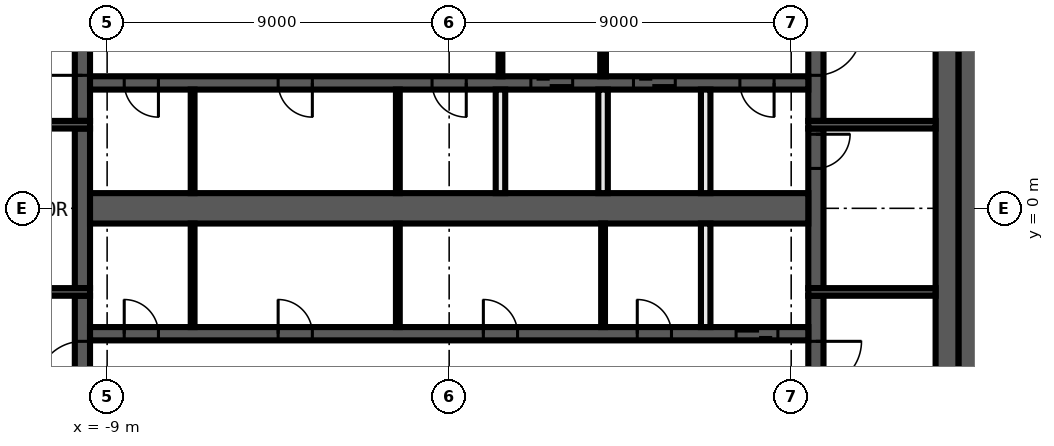
"""IFC4 building model, lengths in metres.
Left out: names, types, materials, properties, quantities, classifications, styles, units other than length and angle.
Written with IfcOpenShell. Run it as: python <this file> out.ifc"""

import sys

from ifc_helpers import new_model, si_unit, direction, frame, frame_2d, origin, place, context, subcontext, project, spatial, rectangle, extrude, element, fill, save


model = new_model("IFC4")
c1 = context("Model", 3, precision=1e-05, world=origin(), true_north=direction((0.0, 1.0)))
c2 = subcontext(c1, "Body", "Model", "MODEL_VIEW")
j1 = project(units=[si_unit("LENGTHUNIT", "METRE"), si_unit("PLANEANGLEUNIT", "RADIAN")], contexts=[c1])
p1 = place(None, origin())
s1 = spatial("IfcSite", under=j1, at=p1, CompositionType="ELEMENT")
p2 = place(p1, origin())
s2 = spatial("IfcBuilding", under=s1, at=p2, CompositionType="ELEMENT")
p3 = place(p2, frame((0.0, 0.0, 367.4)))
s3 = spatial("IfcBuildingStorey", under=s2, at=p3, CompositionType="ELEMENT", Elevation=367.4)
p4 = place(p3, frame((11.367, -20.469, 0.0), z_axis=(0.0, 0.0, 1.0), x_axis=(0.424125024155, 0.905603646131, 0.0)))
e1 = element("IfcWall", 1, at=p4, inside=s3, PredefinedType="SOLIDWALL", context=c2, shape_type="SweptSolid", body=[
    extrude(rectangle(XDim=28.801, YDim=0.25, at=frame_2d((14.401, 0.0))), origin(), (0.0, 0.0, 1.0), 3.8),
])
p5 = place(p3, frame((13.7, 10.4, 0.0), z_axis=(0.0, 0.0, 1.0), x_axis=(0.0, -1.0, 0.0)))
e2 = element("IfcWall", 2, at=p5, inside=s3, PredefinedType="SHEAR", context=c2, shape_type="SweptSolid", body=[
    extrude(rectangle(XDim=20.8, YDim=0.6, at=frame_2d((10.4, 0.0))), origin(), (0.0, 0.0, 1.0), 3.8),
])
p6 = place(p3, frame((13.1, 9.8, 0.0), z_axis=(0.0, 0.0, 1.0), x_axis=(0.0, -1.0, 0.0)))
e3 = element("IfcWall", 3, at=p6, inside=s3, PredefinedType="SHEAR", context=c2, shape_type="SweptSolid", body=[
    extrude(rectangle(XDim=19.6, YDim=0.6, at=frame_2d((9.8, 0.0))), origin(), (0.0, 0.0, 1.0), 3.8),
])
p7 = place(p3, frame((9.65, -2.3, 0.0), z_axis=(0.0, 0.0, 1.0), x_axis=(0.0, -1.0, 0.0)))
e4 = element("IfcWall", 4, at=p7, inside=s3, PredefinedType="SHEAR", context=c2, shape_type="SweptSolid", body=[
    extrude(rectangle(XDim=7.5, YDim=0.4, at=frame_2d((3.75, 0.0))), origin(), (0.0, 0.0, 1.0), 3.8),
])
p8 = place(p7, frame((1.2, 0.0, 0.0)))
e5 = element("IfcOpeningElement", 5, at=p8, cuts=e4, PredefinedType="OPENING", context=c2, shape_type="SweptSolid", body=[
    extrude(rectangle(XDim=1.2, YDim=2.1, at=frame_2d((0.6, 1.05))), frame((0.0, 0.21, 0.0), z_axis=(0.0, -1.0, 0.0), x_axis=(1.0, 0.0, 0.0)), (0.0, 0.0, 1.0), 0.42),
])
p9 = place(p3, frame((9.65, 2.1, 0.0), z_axis=(0.0, 0.0, 1.0), x_axis=(0.0, -1.0, 0.0)))
e6 = element("IfcWall", 6, at=p9, inside=s3, PredefinedType="SHEAR", context=c2, shape_type="SweptSolid", body=[
    extrude(rectangle(XDim=4.2, YDim=0.4, at=frame_2d((2.1, 0.0))), origin(), (0.0, 0.0, 1.0), 3.8),
])
p10 = place(p9, frame((0.15, 0.0, 0.0)))
e7 = element("IfcOpeningElement", 7, at=p10, cuts=e6, PredefinedType="OPENING", context=c2, shape_type="SweptSolid", body=[
    extrude(rectangle(XDim=0.9, YDim=2.1, at=frame_2d((0.45, 1.05))), frame((0.0, 0.21, 0.0), z_axis=(0.0, -1.0, 0.0), x_axis=(1.0, 0.0, 0.0)), (0.0, 0.0, 1.0), 0.42),
])
p11 = place(p3, frame((9.65, 9.8, 0.0), z_axis=(0.0, 0.0, 1.0), x_axis=(0.0, -1.0, 0.0)))
e8 = element("IfcWall", 8, at=p11, inside=s3, PredefinedType="SHEAR", context=c2, shape_type="SweptSolid", body=[
    extrude(rectangle(XDim=7.5, YDim=0.4, at=frame_2d((3.75, 0.0))), origin(), (0.0, 0.0, 1.0), 3.8),
])
p12 = place(p11, frame((5.1, 0.0, 0.0)))
e9 = element("IfcOpeningElement", 9, at=p12, cuts=e8, PredefinedType="OPENING", context=c2, shape_type="SweptSolid", body=[
    extrude(rectangle(XDim=1.2, YDim=2.1, at=frame_2d((0.6, 1.05))), frame((0.0, 0.21, 0.0), z_axis=(0.0, -1.0, 0.0), x_axis=(1.0, 0.0, 0.0)), (0.0, 0.0, 1.0), 0.42),
])
p13 = place(p3, frame((-9.65, -9.8, 0.0), z_axis=(0.0, 0.0, 1.0), x_axis=(0.0, 1.0, 0.0)))
e10 = element("IfcWall", 10, at=p13, inside=s3, PredefinedType="SHEAR", context=c2, shape_type="SweptSolid", body=[
    extrude(rectangle(XDim=7.5, YDim=0.4, at=frame_2d((3.75, 0.0))), origin(), (0.0, 0.0, 1.0), 3.8),
])
p14 = place(p13, frame((5.1, 0.0, 0.0)))
e11 = element("IfcOpeningElement", 11, at=p14, cuts=e10, PredefinedType="OPENING", context=c2, shape_type="SweptSolid", body=[
    extrude(rectangle(XDim=1.2, YDim=2.1, at=frame_2d((0.6, 1.05))), frame((0.0, 0.21, 0.0), z_axis=(0.0, -1.0, 0.0), x_axis=(1.0, 0.0, 0.0)), (0.0, 0.0, 1.0), 0.42),
])
p15 = place(p3, frame((-9.65, -2.1, 0.0), z_axis=(0.0, 0.0, 1.0), x_axis=(0.0, 1.0, 0.0)))
e12 = element("IfcWall", 12, at=p15, inside=s3, PredefinedType="SHEAR", context=c2, shape_type="SweptSolid", body=[
    extrude(rectangle(XDim=4.2, YDim=0.4, at=frame_2d((2.1, 0.0))), origin(), (0.0, 0.0, 1.0), 3.8),
])
p16 = place(p3, frame((-9.65, 2.3, 0.0), z_axis=(0.0, 0.0, 1.0), x_axis=(0.0, 1.0, 0.0)))
e13 = element("IfcWall", 13, at=p16, inside=s3, PredefinedType="SHEAR", context=c2, shape_type="SweptSolid", body=[
    extrude(rectangle(XDim=7.5, YDim=0.4, at=frame_2d((3.75, 0.0))), origin(), (0.0, 0.0, 1.0), 3.8),
])
p17 = place(p16, frame((1.2, 0.0, 0.0)))
e14 = element("IfcOpeningElement", 14, at=p17, cuts=e13, PredefinedType="OPENING", context=c2, shape_type="SweptSolid", body=[
    extrude(rectangle(XDim=1.2, YDim=2.1, at=frame_2d((0.6, 1.05))), frame((0.0, 0.21, 0.0), z_axis=(0.0, -1.0, 0.0), x_axis=(1.0, 0.0, 0.0)), (0.0, 0.0, 1.0), 0.42),
])
for number, where, z_axis, x_axis in (
    (15, (9.45, 2.2, 0.0), (0.0, 0.0, 1.0), (1.0, 0.0, 0.0)),
    (16, (-9.45, 2.2, 0.0), (0.0, 0.0, 1.0), (-1.0, 0.0, 0.0)),
    (17, (9.45, -2.2, 0.0), (0.0, 0.0, 1.0), (1.0, 0.0, 0.0)),
    (18, (-9.45, -2.2, 0.0), (0.0, 0.0, 1.0), (-1.0, 0.0, 0.0)),
):
    element("IfcWall", number, at=place(p3, frame(where, z_axis=z_axis, x_axis=x_axis)), inside=s3, PredefinedType="SHEAR", context=c2, shape_type="SweptSolid", body=[
        extrude(rectangle(XDim=3.35, YDim=0.2, at=frame_2d((1.675, 0.0))), origin(), (0.0, 0.0, 1.0), 3.8),
    ])
p18 = place(p3, frame((9.45, 3.3, 0.0), z_axis=(0.0, 0.0, 1.0), x_axis=(-1.0, 0.0, 0.0)))
e19 = element("IfcWall", 19, at=p18, inside=s3, PredefinedType="SHEAR", context=c2, shape_type="SweptSolid", body=[
    extrude(rectangle(XDim=18.9, YDim=0.35, at=frame_2d((9.45, 0.0))), origin(), (0.0, 0.0, 1.0), 3.8),
])
p19 = place(p18, frame((6.2, 0.0, 0.0)))
e20 = element("IfcOpeningElement", 20, at=p19, cuts=e19, PredefinedType="OPENING", context=c2, shape_type="SweptSolid", body=[
    extrude(rectangle(XDim=1.1, YDim=2.1, at=frame_2d((0.55, 1.05))), frame((0.0, 0.185, 0.0), z_axis=(0.0, -1.0, 0.0), x_axis=(1.0, 0.0, 0.0)), (0.0, 0.0, 1.0), 0.37),
])
p20 = place(p18, frame((3.5, 0.0, 0.0)))
e21 = element("IfcOpeningElement", 21, at=p20, cuts=e19, PredefinedType="OPENING", context=c2, shape_type="SweptSolid", body=[
    extrude(rectangle(XDim=1.1, YDim=2.1, at=frame_2d((0.55, 1.05))), frame((0.0, 0.185, 0.0), z_axis=(0.0, -1.0, 0.0), x_axis=(1.0, 0.0, 0.0)), (0.0, 0.0, 1.0), 0.37),
])
p21 = place(p18, frame((0.9, 0.0, 0.0)))
e22 = element("IfcOpeningElement", 22, at=p21, cuts=e19, PredefinedType="OPENING", context=c2, shape_type="SweptSolid", body=[
    extrude(rectangle(XDim=0.9, YDim=2.1, at=frame_2d((0.45, 1.05))), frame((0.0, 0.185, 0.0), z_axis=(0.0, -1.0, 0.0), x_axis=(1.0, 0.0, 0.0)), (0.0, 0.0, 1.0), 0.37),
])
p22 = place(p18, frame((17.1, 0.0, 0.0)))
e23 = element("IfcOpeningElement", 23, at=p22, cuts=e19, PredefinedType="OPENING", context=c2, shape_type="SweptSolid", body=[
    extrude(rectangle(XDim=0.9, YDim=2.1, at=frame_2d((0.45, 1.05))), frame((0.0, 0.185, 0.0), z_axis=(0.0, -1.0, 0.0), x_axis=(1.0, 0.0, 0.0)), (0.0, 0.0, 1.0), 0.37),
])
p23 = place(p18, frame((13.05, 0.0, 0.0)))
e24 = element("IfcOpeningElement", 24, at=p23, cuts=e19, PredefinedType="OPENING", context=c2, shape_type="SweptSolid", body=[
    extrude(rectangle(XDim=0.9, YDim=2.1, at=frame_2d((0.45, 1.05))), frame((0.0, 0.185, 0.0), z_axis=(0.0, -1.0, 0.0), x_axis=(1.0, 0.0, 0.0)), (0.0, 0.0, 1.0), 0.37),
])
p24 = place(p18, frame((9.0, 0.0, 0.0)))
e25 = element("IfcOpeningElement", 25, at=p24, cuts=e19, PredefinedType="OPENING", context=c2, shape_type="SweptSolid", body=[
    extrude(rectangle(XDim=0.9, YDim=2.1, at=frame_2d((0.45, 1.05))), frame((0.0, 0.185, 0.0), z_axis=(0.0, -1.0, 0.0), x_axis=(1.0, 0.0, 0.0)), (0.0, 0.0, 1.0), 0.37),
])
p25 = place(p3, frame((-9.45, -3.3, 0.0), z_axis=(0.0, 0.0, 1.0), x_axis=(1.0, 0.0, 0.0)))
e26 = element("IfcWall", 26, at=p25, inside=s3, PredefinedType="SHEAR", context=c2, shape_type="SweptSolid", body=[
    extrude(rectangle(XDim=18.9, YDim=0.35, at=frame_2d((9.45, 0.0))), origin(), (0.0, 0.0, 1.0), 3.8),
])
p26 = place(p25, frame((17.0, 0.0, 0.0)))
e27 = element("IfcOpeningElement", 27, at=p26, cuts=e26, PredefinedType="OPENING", context=c2, shape_type="SweptSolid", body=[
    extrude(rectangle(XDim=1.1, YDim=2.1, at=frame_2d((0.55, 1.05))), frame((0.0, 0.185, 0.0), z_axis=(0.0, -1.0, 0.0), x_axis=(1.0, 0.0, 0.0)), (0.0, 0.0, 1.0), 0.37),
])
p27 = place(p25, frame((0.9, 0.0, 0.0)))
e28 = element("IfcOpeningElement", 28, at=p27, cuts=e26, PredefinedType="OPENING", context=c2, shape_type="SweptSolid", body=[
    extrude(rectangle(XDim=0.9, YDim=2.1, at=frame_2d((0.45, 1.05))), frame((0.0, 0.185, 0.0), z_axis=(0.0, -1.0, 0.0), x_axis=(1.0, 0.0, 0.0)), (0.0, 0.0, 1.0), 0.37),
])
p28 = place(p25, frame((4.95, 0.0, 0.0)))
e29 = element("IfcOpeningElement", 29, at=p28, cuts=e26, PredefinedType="OPENING", context=c2, shape_type="SweptSolid", body=[
    extrude(rectangle(XDim=0.9, YDim=2.1, at=frame_2d((0.45, 1.05))), frame((0.0, 0.185, 0.0), z_axis=(0.0, -1.0, 0.0), x_axis=(1.0, 0.0, 0.0)), (0.0, 0.0, 1.0), 0.37),
])
p29 = place(p25, frame((10.35, 0.0, 0.0)))
e30 = element("IfcOpeningElement", 30, at=p29, cuts=e26, PredefinedType="OPENING", context=c2, shape_type="SweptSolid", body=[
    extrude(rectangle(XDim=0.9, YDim=2.1, at=frame_2d((0.45, 1.05))), frame((0.0, 0.185, 0.0), z_axis=(0.0, -1.0, 0.0), x_axis=(1.0, 0.0, 0.0)), (0.0, 0.0, 1.0), 0.37),
])
p30 = place(p25, frame((14.4, 0.0, 0.0)))
e31 = element("IfcOpeningElement", 31, at=p30, cuts=e26, PredefinedType="OPENING", context=c2, shape_type="SweptSolid", body=[
    extrude(rectangle(XDim=0.9, YDim=2.1, at=frame_2d((0.45, 1.05))), frame((0.0, 0.185, 0.0), z_axis=(0.0, -1.0, 0.0), x_axis=(1.0, 0.0, 0.0)), (0.0, 0.0, 1.0), 0.37),
])
p31 = place(p3, frame((-9.45, 0.0, 0.0), z_axis=(0.0, 0.0, 1.0), x_axis=(1.0, 0.0, 0.0)))
e32 = element("IfcWall", 32, at=p31, inside=s3, PredefinedType="SHEAR", context=c2, shape_type="SweptSolid", body=[
    extrude(rectangle(XDim=18.9, YDim=0.8, at=frame_2d((9.45, 0.0))), origin(), (0.0, 0.0, 1.0), 3.8),
])
for number, where, z_axis, x_axis in (
    (33, (6.75, -3.125, 0.0), (0.0, 0.0, 1.0), (0.0, 1.0, 0.0)),
    (34, (6.75, 0.4, 0.0), (0.0, 0.0, 1.0), (0.0, 1.0, 0.0)),
):
    element("IfcWall", number, at=place(p3, frame(where, z_axis=z_axis, x_axis=x_axis)), inside=s3, PredefinedType="SOLIDWALL", context=c2, shape_type="SweptSolid", body=[
        extrude(rectangle(XDim=2.725, YDim=0.25, at=frame_2d((1.363, 0.0))), origin(), (0.0, 0.0, 1.0), 3.8),
    ])
p32 = place(p3, frame((4.05, 6.725, 0.0), z_axis=(0.0, 0.0, 1.0), x_axis=(0.0, -1.0, 0.0)))
e35 = element("IfcWall", 35, at=p32, inside=s3, PredefinedType="PARTITIONING", context=c2, shape_type="SweptSolid", body=[
    extrude(rectangle(XDim=3.25, YDim=0.15, at=frame_2d((1.625, 0.0))), origin(), (0.0, 0.0, 1.0), 3.8),
])
p33 = place(p32, frame((1.025, 0.0, 0.0)))
e36 = element("IfcOpeningElement", 36, at=p33, cuts=e35, PredefinedType="OPENING", context=c2, shape_type="SweptSolid", body=[
    extrude(rectangle(XDim=1.2, YDim=2.1, at=frame_2d((0.6, 1.05))), frame((0.0, 0.085, 0.0), z_axis=(0.0, -1.0, 0.0), x_axis=(1.0, 0.0, 0.0)), (0.0, 0.0, 1.0), 0.17),
])
p34 = place(p3, frame((4.05, -3.125, 0.0), z_axis=(0.0, 0.0, 1.0), x_axis=(0.0, 1.0, 0.0)))
e37 = element("IfcWall", 37, at=p34, inside=s3, PredefinedType="PARTITIONING", context=c2, shape_type="SweptSolid", body=[
    extrude(rectangle(XDim=2.725, YDim=0.1, at=frame_2d((1.363, 0.0))), origin(), (0.0, 0.0, 1.0), 3.8),
])
p35 = place(p3, frame((4.05, 0.4, 0.0), z_axis=(0.0, 0.0, 1.0), x_axis=(0.0, 1.0, 0.0)))
e38 = element("IfcWall", 38, at=p35, inside=s3, PredefinedType="SOLIDWALL", context=c2, shape_type="SweptSolid", body=[
    extrude(rectangle(XDim=2.725, YDim=0.25, at=frame_2d((1.363, 0.0))), origin(), (0.0, 0.0, 1.0), 3.8),
])
p36 = place(p3, frame((1.35, 6.725, 0.0), z_axis=(0.0, 0.0, 1.0), x_axis=(0.0, -1.0, 0.0)))
e39 = element("IfcWall", 39, at=p36, inside=s3, PredefinedType="PARTITIONING", context=c2, shape_type="SweptSolid", body=[
    extrude(rectangle(XDim=3.25, YDim=0.1, at=frame_2d((1.625, 0.0))), origin(), (0.0, 0.0, 1.0), 3.8),
])
p37 = place(p36, frame((1.025, 0.0, 0.0)))
e40 = element("IfcOpeningElement", 40, at=p37, cuts=e39, PredefinedType="OPENING", context=c2, shape_type="SweptSolid", body=[
    extrude(rectangle(XDim=1.2, YDim=2.1, at=frame_2d((0.6, 1.05))), frame((0.0, 0.06, 0.0), z_axis=(0.0, -1.0, 0.0), x_axis=(1.0, 0.0, 0.0)), (0.0, 0.0, 1.0), 0.12),
])
p38 = place(p3, frame((1.35, 0.4, 0.0), z_axis=(0.0, 0.0, 1.0), x_axis=(0.0, 1.0, 0.0)))
e41 = element("IfcWall", 41, at=p38, inside=s3, PredefinedType="SOLIDWALL", context=c2, shape_type="SweptSolid", body=[
    extrude(rectangle(XDim=2.725, YDim=0.25, at=frame_2d((1.363, 0.0))), origin(), (0.0, 0.0, 1.0), 3.8),
])
for number, where, z_axis, x_axis in (
    (42, (-1.35, -3.125, 0.0), (0.0, 0.0, 1.0), (0.0, 1.0, 0.0)),
    (43, (-1.35, 0.4, 0.0), (0.0, 0.0, 1.0), (0.0, 1.0, 0.0)),
    (44, (-6.75, -3.125, 0.0), (0.0, 0.0, 1.0), (0.0, 1.0, 0.0)),
    (45, (-6.75, 0.4, 0.0), (0.0, 0.0, 1.0), (0.0, 1.0, 0.0)),
):
    element("IfcWall", number, at=place(p3, frame(where, z_axis=z_axis, x_axis=x_axis)), inside=s3, PredefinedType="PARTITIONING", context=c2, shape_type="SweptSolid", body=[
        extrude(rectangle(XDim=2.725, YDim=0.1, at=frame_2d((1.363, 0.0))), origin(), (0.0, 0.0, 1.0), 3.8),
    ])
p39 = place(p10, origin())
e46 = element("IfcDoor", 46, at=p39, inside=s3, OperationType="SINGLE_SWING_RIGHT", PredefinedType="DOOR", context=c2, shape_type="SweptSolid", body=[
    extrude(rectangle(XDim=0.9, YDim=2.1, at=frame_2d((0.45, 1.05))), frame((0.0, 0.025, 0.0), z_axis=(0.0, -1.0, 0.0), x_axis=(1.0, 0.0, 0.0)), (0.0, 0.0, 1.0), 0.05),
])
fill(e7, e46)
p40 = place(p19, origin())
e47 = element("IfcDoor", 47, at=p40, inside=s3, OperationType="DOUBLE_DOOR_SLIDING", PredefinedType="DOOR", context=c2, shape_type="SweptSolid", body=[
    extrude(rectangle(XDim=1.1, YDim=2.1, at=frame_2d((0.55, 1.05))), frame((0.0, 0.025, 0.0), z_axis=(0.0, -1.0, 0.0), x_axis=(1.0, 0.0, 0.0)), (0.0, 0.0, 1.0), 0.05),
])
fill(e20, e47)
p41 = place(p20, origin())
e48 = element("IfcDoor", 48, at=p41, inside=s3, OperationType="DOUBLE_DOOR_SLIDING", PredefinedType="DOOR", context=c2, shape_type="SweptSolid", body=[
    extrude(rectangle(XDim=1.1, YDim=2.1, at=frame_2d((0.55, 1.05))), frame((0.0, 0.025, 0.0), z_axis=(0.0, -1.0, 0.0), x_axis=(1.0, 0.0, 0.0)), (0.0, 0.0, 1.0), 0.05),
])
fill(e21, e48)
p42 = place(p21, origin())
e49 = element("IfcDoor", 49, at=p42, inside=s3, OperationType="SINGLE_SWING_LEFT", PredefinedType="DOOR", context=c2, shape_type="SweptSolid", body=[
    extrude(rectangle(XDim=0.9, YDim=2.1, at=frame_2d((0.45, 1.05))), frame((0.0, 0.025, 0.0), z_axis=(0.0, -1.0, 0.0), x_axis=(1.0, 0.0, 0.0)), (0.0, 0.0, 1.0), 0.05),
])
fill(e22, e49)
p43 = place(p26, origin())
e50 = element("IfcDoor", 50, at=p43, inside=s3, OperationType="DOUBLE_DOOR_SLIDING", PredefinedType="DOOR", context=c2, shape_type="SweptSolid", body=[
    extrude(rectangle(XDim=1.1, YDim=2.1, at=frame_2d((0.55, 1.05))), frame((0.0, 0.025, 0.0), z_axis=(0.0, -1.0, 0.0), x_axis=(1.0, 0.0, 0.0)), (0.0, 0.0, 1.0), 0.05),
])
fill(e27, e50)
p44 = place(p22, origin())
e51 = element("IfcDoor", 51, at=p44, inside=s3, OperationType="SINGLE_SWING_LEFT", PredefinedType="DOOR", context=c2, shape_type="SweptSolid", body=[
    extrude(rectangle(XDim=0.9, YDim=2.1, at=frame_2d((0.45, 1.05))), frame((0.0, 0.025, 0.0), z_axis=(0.0, -1.0, 0.0), x_axis=(1.0, 0.0, 0.0)), (0.0, 0.0, 1.0), 0.05),
])
fill(e23, e51)
p45 = place(p23, origin())
e52 = element("IfcDoor", 52, at=p45, inside=s3, OperationType="SINGLE_SWING_RIGHT", PredefinedType="DOOR", context=c2, shape_type="SweptSolid", body=[
    extrude(rectangle(XDim=0.9, YDim=2.1, at=frame_2d((0.45, 1.05))), frame((0.0, 0.025, 0.0), z_axis=(0.0, -1.0, 0.0), x_axis=(1.0, 0.0, 0.0)), (0.0, 0.0, 1.0), 0.05),
])
fill(e24, e52)
p46 = place(p24, origin())
e53 = element("IfcDoor", 53, at=p46, inside=s3, OperationType="SINGLE_SWING_LEFT", PredefinedType="DOOR", context=c2, shape_type="SweptSolid", body=[
    extrude(rectangle(XDim=0.9, YDim=2.1, at=frame_2d((0.45, 1.05))), frame((0.0, 0.025, 0.0), z_axis=(0.0, -1.0, 0.0), x_axis=(1.0, 0.0, 0.0)), (0.0, 0.0, 1.0), 0.05),
])
fill(e25, e53)
p47 = place(p27, origin())
e54 = element("IfcDoor", 54, at=p47, inside=s3, OperationType="SINGLE_SWING_RIGHT", PredefinedType="DOOR", context=c2, shape_type="SweptSolid", body=[
    extrude(rectangle(XDim=0.9, YDim=2.1, at=frame_2d((0.45, 1.05))), frame((0.0, 0.025, 0.0), z_axis=(0.0, -1.0, 0.0), x_axis=(1.0, 0.0, 0.0)), (0.0, 0.0, 1.0), 0.05),
])
fill(e28, e54)
p48 = place(p28, origin())
e55 = element("IfcDoor", 55, at=p48, inside=s3, OperationType="SINGLE_SWING_LEFT", PredefinedType="DOOR", context=c2, shape_type="SweptSolid", body=[
    extrude(rectangle(XDim=0.9, YDim=2.1, at=frame_2d((0.45, 1.05))), frame((0.0, 0.025, 0.0), z_axis=(0.0, -1.0, 0.0), x_axis=(1.0, 0.0, 0.0)), (0.0, 0.0, 1.0), 0.05),
])
fill(e29, e55)
p49 = place(p29, origin())
e56 = element("IfcDoor", 56, at=p49, inside=s3, OperationType="SINGLE_SWING_RIGHT", PredefinedType="DOOR", context=c2, shape_type="SweptSolid", body=[
    extrude(rectangle(XDim=0.9, YDim=2.1, at=frame_2d((0.45, 1.05))), frame((0.0, 0.025, 0.0), z_axis=(0.0, -1.0, 0.0), x_axis=(1.0, 0.0, 0.0)), (0.0, 0.0, 1.0), 0.05),
])
fill(e30, e56)
p50 = place(p30, origin())
e57 = element("IfcDoor", 57, at=p50, inside=s3, OperationType="SINGLE_SWING_LEFT", PredefinedType="DOOR", context=c2, shape_type="SweptSolid", body=[
    extrude(rectangle(XDim=0.9, YDim=2.1, at=frame_2d((0.45, 1.05))), frame((0.0, 0.025, 0.0), z_axis=(0.0, -1.0, 0.0), x_axis=(1.0, 0.0, 0.0)), (0.0, 0.0, 1.0), 0.05),
])
fill(e31, e57)
p51 = place(p12, origin())
e58 = element("IfcDoor", 58, at=p51, inside=s3, OperationType="SINGLE_SWING_LEFT", PredefinedType="DOOR", context=c2, shape_type="SweptSolid", body=[
    extrude(rectangle(XDim=1.2, YDim=2.1, at=frame_2d((0.6, 1.05))), frame((0.0, 0.025, 0.0), z_axis=(0.0, -1.0, 0.0), x_axis=(1.0, 0.0, 0.0)), (0.0, 0.0, 1.0), 0.05),
])
fill(e9, e58)
p52 = place(p17, origin())
e59 = element("IfcDoor", 59, at=p52, inside=s3, OperationType="SINGLE_SWING_RIGHT", PredefinedType="DOOR", context=c2, shape_type="SweptSolid", body=[
    extrude(rectangle(XDim=1.2, YDim=2.1, at=frame_2d((0.6, 1.05))), frame((0.0, 0.025, 0.0), z_axis=(0.0, -1.0, 0.0), x_axis=(1.0, 0.0, 0.0)), (0.0, 0.0, 1.0), 0.05),
])
fill(e14, e59)
p53 = place(p8, origin())
e60 = element("IfcDoor", 60, at=p53, inside=s3, OperationType="SINGLE_SWING_RIGHT", PredefinedType="DOOR", context=c2, shape_type="SweptSolid", body=[
    extrude(rectangle(XDim=1.2, YDim=2.1, at=frame_2d((0.6, 1.05))), frame((0.0, 0.025, 0.0), z_axis=(0.0, -1.0, 0.0), x_axis=(1.0, 0.0, 0.0)), (0.0, 0.0, 1.0), 0.05),
])
fill(e5, e60)
p54 = place(p14, origin())
e61 = element("IfcDoor", 61, at=p54, inside=s3, OperationType="SINGLE_SWING_LEFT", PredefinedType="DOOR", context=c2, shape_type="SweptSolid", body=[
    extrude(rectangle(XDim=1.2, YDim=2.1, at=frame_2d((0.6, 1.05))), frame((0.0, 0.025, 0.0), z_axis=(0.0, -1.0, 0.0), x_axis=(1.0, 0.0, 0.0)), (0.0, 0.0, 1.0), 0.05),
])
fill(e11, e61)
save(model, sys.argv[1])
